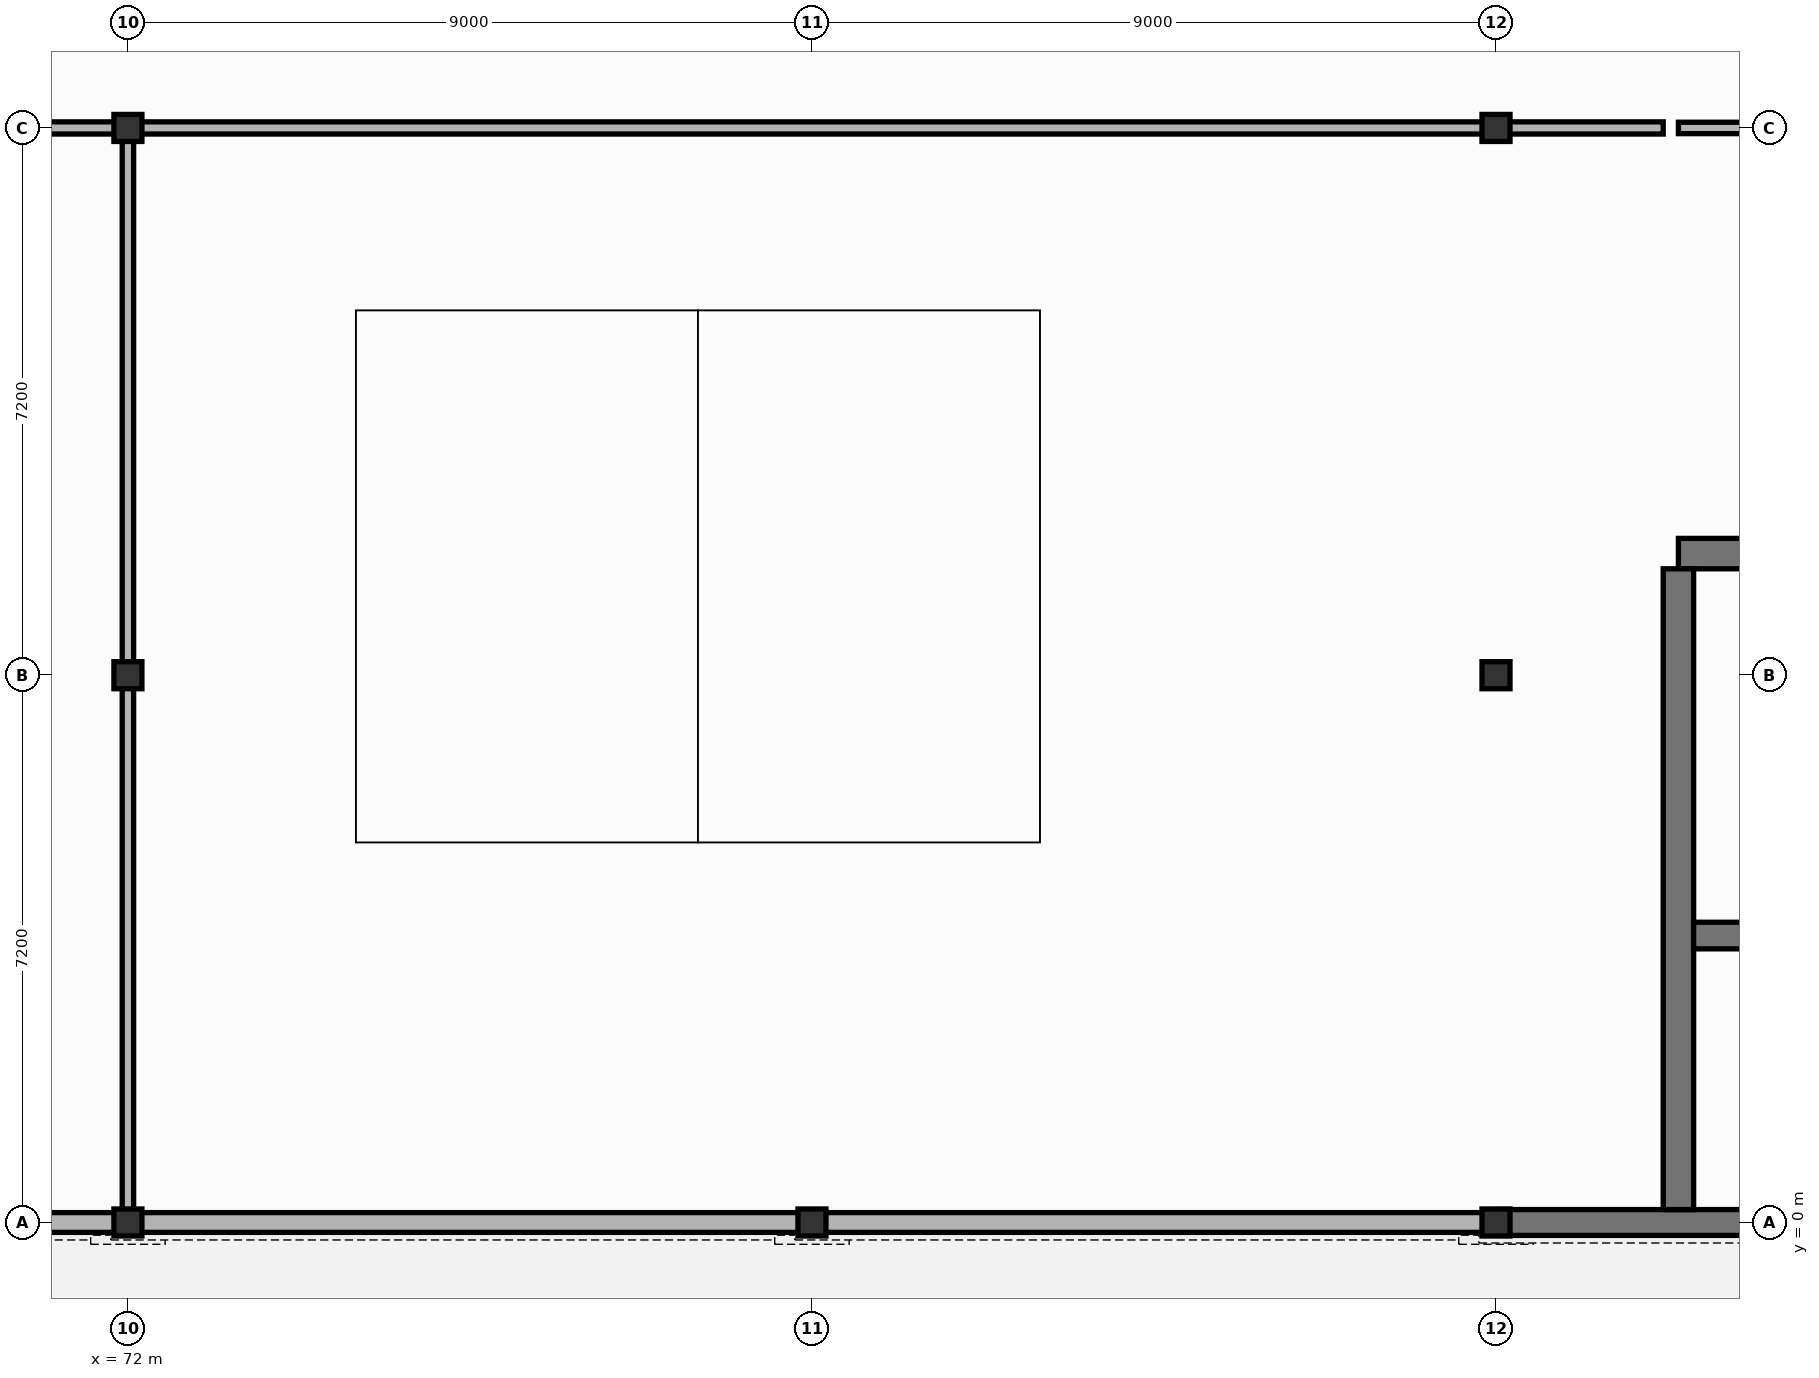
"""IFC4 building model, lengths in metres.
Left out: names, types, materials, properties, quantities, classifications, styles, units other than length and angle.
Written with IfcOpenShell. Run it as: python <this file> out.ifc"""

import sys

from ifc_helpers import new_model, si_unit, direction, frame, frame_2d, origin, origin_2d, place, context, subcontext, project, spatial, rectangle, i_section, extrude, element, fill, save


model = new_model("IFC4")
c1 = context("Model", 3, precision=1e-05, world=origin(), true_north=direction((0.0, 1.0)))
c2 = subcontext(c1, "Body", "Model", "MODEL_VIEW")
j1 = project(units=[si_unit("LENGTHUNIT", "METRE"), si_unit("PLANEANGLEUNIT", "RADIAN")], contexts=[c1])
p1 = place(None, origin())
s1 = spatial("IfcSite", under=j1, at=p1, CompositionType="ELEMENT")
p2 = place(p1, origin())
s2 = spatial("IfcBuilding", under=s1, at=p2, CompositionType="ELEMENT")
p3 = place(p2, origin())
s3 = spatial("IfcBuildingStorey", under=s2, at=p3, CompositionType="ELEMENT", Elevation=0.0)
for number, where, z_axis, x_axis in (
    (1, (72.0, 0.0, 0.0), (0.0, 0.0, 1.0), (1.0, 0.0, 0.0)),
    (2, (72.0, 7.2, 0.0), (0.0, 0.0, 1.0), (1.0, 0.0, 0.0)),
    (3, (72.0, 14.4, 0.0), (0.0, 0.0, 1.0), (1.0, 0.0, 0.0)),
    (4, (81.0, 0.0, 0.0), (0.0, 0.0, 1.0), (1.0, 0.0, 0.0)),
    (5, (90.0, 0.0, 0.0), (0.0, 0.0, 1.0), (1.0, 0.0, 0.0)),
    (6, (90.0, 7.2, 0.0), (0.0, 0.0, 1.0), (1.0, 0.0, 0.0)),
    (7, (90.0, 14.4, 0.0), (0.0, 0.0, 1.0), (1.0, 0.0, 0.0)),
):
    element("IfcColumn", number, at=place(p3, frame(where, z_axis=z_axis, x_axis=x_axis)), inside=s3, PredefinedType="COLUMN", context=c2, shape_type="SweptSolid", body=[
        extrude(i_section(OverallWidth=0.368, OverallDepth=0.356, WebThickness=0.011, FlangeThickness=0.018, at=origin_2d()), origin(), (0.0, 0.0, 1.0), 5.1),
    ])
p4 = place(p3, frame((63.0, 0.0, 0.0), z_axis=(0.0, 0.0, 1.0), x_axis=(1.0, 0.0, 0.0)))
e8 = element("IfcWall", 8, at=p4, inside=s3, PredefinedType="SOLIDWALL", context=c2, shape_type="SweptSolid", body=[
    extrude(rectangle(XDim=9.0, YDim=0.26, at=frame_2d((4.5, 0.0))), origin(), (0.0, 0.0, 1.0), 3.45),
])
p5 = place(p4, frame((1.8, 0.0, 0.65)))
e9 = element("IfcOpeningElement", 9, at=p5, cuts=e8, PredefinedType="OPENING", context=c2, shape_type="SweptSolid", body=[
    extrude(rectangle(XDim=2.2, YDim=1.95, at=frame_2d((1.1, 0.975))), frame((0.0, 0.14, 0.0), z_axis=(0.0, -1.0, 0.0), x_axis=(1.0, 0.0, 0.0)), (0.0, 0.0, 1.0), 0.28),
])
p6 = place(p4, frame((5.4, 0.0, 0.65)))
e10 = element("IfcOpeningElement", 10, at=p6, cuts=e8, PredefinedType="OPENING", context=c2, shape_type="SweptSolid", body=[
    extrude(rectangle(XDim=1.4, YDim=1.8, at=frame_2d((0.7, 0.9))), frame((0.0, 0.14, 0.0), z_axis=(0.0, -1.0, 0.0), x_axis=(1.0, 0.0, 0.0)), (0.0, 0.0, 1.0), 0.28),
])
p7 = place(p3, frame((72.0, 0.0, 0.0), z_axis=(0.0, 0.0, 1.0), x_axis=(1.0, 0.0, 0.0)))
e11 = element("IfcWall", 11, at=p7, inside=s3, PredefinedType="SOLIDWALL", context=c2, shape_type="SweptSolid", body=[
    extrude(rectangle(XDim=9.0, YDim=0.26, at=frame_2d((4.5, 0.0))), origin(), (0.0, 0.0, 1.0), 3.45),
])
p8 = place(p7, frame((1.8, 0.0, 0.65)))
e12 = element("IfcOpeningElement", 12, at=p8, cuts=e11, PredefinedType="OPENING", context=c2, shape_type="SweptSolid", body=[
    extrude(rectangle(XDim=2.2, YDim=1.95, at=frame_2d((1.1, 0.975))), frame((0.0, 0.14, 0.0), z_axis=(0.0, -1.0, 0.0), x_axis=(1.0, 0.0, 0.0)), (0.0, 0.0, 1.0), 0.28),
])
p9 = place(p7, frame((5.4, 0.0, 0.65)))
e13 = element("IfcOpeningElement", 13, at=p9, cuts=e11, PredefinedType="OPENING", context=c2, shape_type="SweptSolid", body=[
    extrude(rectangle(XDim=1.4, YDim=1.8, at=frame_2d((0.7, 0.9))), frame((0.0, 0.14, 0.0), z_axis=(0.0, -1.0, 0.0), x_axis=(1.0, 0.0, 0.0)), (0.0, 0.0, 1.0), 0.28),
])
p10 = place(p3, frame((81.0, 0.0, 0.0), z_axis=(0.0, 0.0, 1.0), x_axis=(1.0, 0.0, 0.0)))
e14 = element("IfcWall", 14, at=p10, inside=s3, PredefinedType="SOLIDWALL", context=c2, shape_type="SweptSolid", body=[
    extrude(rectangle(XDim=9.0, YDim=0.26, at=frame_2d((4.5, 0.0))), origin(), (0.0, 0.0, 1.0), 3.45),
])
p11 = place(p10, frame((1.8, 0.0, 0.65)))
e15 = element("IfcOpeningElement", 15, at=p11, cuts=e14, PredefinedType="OPENING", context=c2, shape_type="SweptSolid", body=[
    extrude(rectangle(XDim=2.2, YDim=1.95, at=frame_2d((1.1, 0.975))), frame((0.0, 0.14, 0.0), z_axis=(0.0, -1.0, 0.0), x_axis=(1.0, 0.0, 0.0)), (0.0, 0.0, 1.0), 0.28),
])
p12 = place(p10, frame((5.4, 0.0, 0.65)))
e16 = element("IfcOpeningElement", 16, at=p12, cuts=e14, PredefinedType="OPENING", context=c2, shape_type="SweptSolid", body=[
    extrude(rectangle(XDim=1.4, YDim=1.8, at=frame_2d((0.7, 0.9))), frame((0.0, 0.14, 0.0), z_axis=(0.0, -1.0, 0.0), x_axis=(1.0, 0.0, 0.0)), (0.0, 0.0, 1.0), 0.28),
])
p13 = place(p3, frame((90.0, 0.0, 0.0), z_axis=(0.0, 0.0, 1.0), x_axis=(1.0, 0.0, 0.0)))
e17 = element("IfcWall", 17, at=p13, inside=s3, PredefinedType="SOLIDWALL", context=c2, shape_type="SweptSolid", body=[
    extrude(rectangle(XDim=9.0, YDim=0.34, at=frame_2d((4.5, 0.0))), origin(), (0.0, 0.0, 1.0), 4.8),
])
p14 = place(p13, frame((2.75, 0.0, 0.0)))
e18 = element("IfcOpeningElement", 18, at=p14, cuts=e17, PredefinedType="OPENING", context=c2, shape_type="SweptSolid", body=[
    extrude(rectangle(XDim=1.8, YDim=2.4, at=frame_2d((0.9, 1.2))), frame((0.0, 0.18, 0.0), z_axis=(0.0, -1.0, 0.0), x_axis=(1.0, 0.0, 0.0)), (0.0, 0.0, 1.0), 0.36),
])
p15 = place(p3, frame((92.4, 8.8, 0.0), z_axis=(0.0, 0.0, 1.0), x_axis=(1.0, 0.0, 0.0)))
e19 = element("IfcWall", 19, at=p15, inside=s3, PredefinedType="SHEAR", context=c2, shape_type="SweptSolid", body=[
    extrude(rectangle(XDim=10.4, YDim=0.4, at=frame_2d((5.2, 0.0))), origin(), (0.0, 0.0, 1.0), 4.8),
])
p16 = place(p15, frame((2.4, 0.0, 0.0)))
e20 = element("IfcOpeningElement", 20, at=p16, cuts=e19, PredefinedType="OPENING", context=c2, shape_type="SweptSolid", body=[
    extrude(rectangle(XDim=1.5, YDim=2.2, at=frame_2d((0.75, 1.1))), frame((0.0, 0.21, 0.0), z_axis=(0.0, -1.0, 0.0), x_axis=(1.0, 0.0, 0.0)), (0.0, 0.0, 1.0), 0.42),
])
p17 = place(p3, frame((92.4, 0.17, 0.0), z_axis=(0.0, 0.0, 1.0), x_axis=(0.0, 1.0, 0.0)))
e21 = element("IfcWall", 21, at=p17, inside=s3, PredefinedType="SHEAR", context=c2, shape_type="SweptSolid", body=[
    extrude(rectangle(XDim=8.43, YDim=0.4, at=frame_2d((4.215, 0.0))), origin(), (0.0, 0.0, 1.0), 4.8),
])
p18 = place(p3, frame((92.6, 3.775, 0.0), z_axis=(0.0, 0.0, 1.0), x_axis=(1.0, 0.0, 0.0)))
e22 = element("IfcWall", 22, at=p18, inside=s3, PredefinedType="SHEAR", context=c2, shape_type="SweptSolid", body=[
    extrude(rectangle(XDim=10.0, YDim=0.35, at=frame_2d((5.0, 0.0))), origin(), (0.0, 0.0, 1.0), 4.8),
])
p19 = place(p18, frame((0.45, 0.0, 0.0)))
e23 = element("IfcOpeningElement", 23, at=p19, cuts=e22, PredefinedType="OPENING", context=c2, shape_type="SweptSolid", body=[
    extrude(rectangle(XDim=1.05, YDim=2.2, at=frame_2d((0.525, 1.1))), frame((0.0, 0.185, 0.0), z_axis=(0.0, -1.0, 0.0), x_axis=(1.0, 0.0, 0.0)), (0.0, 0.0, 1.0), 0.37),
])
p20 = place(p3, frame((54.0, 14.4, 0.0), z_axis=(0.0, 0.0, 1.0), x_axis=(1.0, 0.0, 0.0)))
e24 = element("IfcWall", 24, at=p20, inside=s3, PredefinedType="PARTITIONING", context=c2, shape_type="SweptSolid", body=[
    extrude(rectangle(XDim=38.2, YDim=0.16, at=frame_2d((19.1, 0.0))), origin(), (0.0, 0.0, 1.0), 3.898),
])
p21 = place(p20, frame((3.6, 0.0, 0.0)))
e25 = element("IfcOpeningElement", 25, at=p21, cuts=e24, PredefinedType="OPENING", context=c2, shape_type="SweptSolid", body=[
    extrude(rectangle(XDim=1.6, YDim=2.2, at=frame_2d((0.8, 1.1))), frame((0.0, 0.09, 0.0), z_axis=(0.0, -1.0, 0.0), x_axis=(1.0, 0.0, 0.0)), (0.0, 0.0, 1.0), 0.18),
])
p22 = place(p20, frame((21.6, 0.0, 0.0)))
e26 = element("IfcOpeningElement", 26, at=p22, cuts=e24, PredefinedType="OPENING", context=c2, shape_type="SweptSolid", body=[
    extrude(rectangle(XDim=1.6, YDim=2.2, at=frame_2d((0.8, 1.1))), frame((0.0, 0.09, 0.0), z_axis=(0.0, -1.0, 0.0), x_axis=(1.0, 0.0, 0.0)), (0.0, 0.0, 1.0), 0.18),
])
p23 = place(p3, frame((72.0, 0.0, 0.0), z_axis=(0.0, 0.0, 1.0), x_axis=(0.0, 1.0, 0.0)))
e27 = element("IfcWall", 27, at=p23, inside=s3, PredefinedType="PARTITIONING", context=c2, shape_type="SweptSolid", body=[
    extrude(rectangle(XDim=14.4, YDim=0.15, at=frame_2d((7.2, 0.0))), origin(), (0.0, 0.0, 1.0), 4.363),
])
p24 = place(p3, frame((92.4, 14.4, 0.0), z_axis=(0.0, 0.0, 1.0), x_axis=(1.0, 0.0, 0.0)))
e28 = element("IfcWall", 28, at=p24, inside=s3, PredefinedType="PARTITIONING", context=c2, shape_type="SweptSolid", body=[
    extrude(rectangle(XDim=15.6, YDim=0.15, at=frame_2d((7.8, 0.0))), origin(), (0.0, 0.0, 1.0), 4.208),
])
p25 = place(p24, frame((4.5, 0.0, 0.0)))
e29 = element("IfcOpeningElement", 29, at=p25, cuts=e28, PredefinedType="OPENING", context=c2, shape_type="SweptSolid", body=[
    extrude(rectangle(XDim=1.0, YDim=2.15, at=frame_2d((0.5, 1.075))), frame((0.0, 0.085, 0.0), z_axis=(0.0, -1.0, 0.0), x_axis=(1.0, 0.0, 0.0)), (0.0, 0.0, 1.0), 0.17),
])
p26 = place(p24, frame((11.8, 0.0, 0.0)))
e30 = element("IfcOpeningElement", 30, at=p26, cuts=e28, PredefinedType="OPENING", context=c2, shape_type="SweptSolid", body=[
    extrude(rectangle(XDim=0.95, YDim=2.15, at=frame_2d((0.475, 1.075))), frame((0.0, 0.085, 0.0), z_axis=(0.0, -1.0, 0.0), x_axis=(1.0, 0.0, 0.0)), (0.0, 0.0, 1.0), 0.17),
])
p27 = place(p8, origin())
e31 = element("IfcWindow", 31, at=p27, inside=s3, PartitioningType="SINGLE_PANEL", PredefinedType="WINDOW", context=c2, shape_type="SweptSolid", body=[
    extrude(rectangle(XDim=2.2, YDim=1.95, at=frame_2d((1.1, 0.975))), frame((0.0, 0.03, 0.0), z_axis=(0.0, -1.0, 0.0), x_axis=(1.0, 0.0, 0.0)), (0.0, 0.0, 1.0), 0.06),
])
fill(e12, e31)
p28 = place(p9, origin())
e32 = element("IfcWindow", 32, at=p28, inside=s3, PartitioningType="SINGLE_PANEL", PredefinedType="WINDOW", context=c2, shape_type="SweptSolid", body=[
    extrude(rectangle(XDim=1.4, YDim=1.8, at=frame_2d((0.7, 0.9))), frame((0.0, 0.03, 0.0), z_axis=(0.0, -1.0, 0.0), x_axis=(1.0, 0.0, 0.0)), (0.0, 0.0, 1.0), 0.06),
])
fill(e13, e32)
p29 = place(p11, origin())
e33 = element("IfcWindow", 33, at=p29, inside=s3, PartitioningType="SINGLE_PANEL", PredefinedType="WINDOW", context=c2, shape_type="SweptSolid", body=[
    extrude(rectangle(XDim=2.2, YDim=1.95, at=frame_2d((1.1, 0.975))), frame((0.0, 0.03, 0.0), z_axis=(0.0, -1.0, 0.0), x_axis=(1.0, 0.0, 0.0)), (0.0, 0.0, 1.0), 0.06),
])
fill(e15, e33)
p30 = place(p12, origin())
e34 = element("IfcWindow", 34, at=p30, inside=s3, PartitioningType="SINGLE_PANEL", PredefinedType="WINDOW", context=c2, shape_type="SweptSolid", body=[
    extrude(rectangle(XDim=1.4, YDim=1.8, at=frame_2d((0.7, 0.9))), frame((0.0, 0.03, 0.0), z_axis=(0.0, -1.0, 0.0), x_axis=(1.0, 0.0, 0.0)), (0.0, 0.0, 1.0), 0.06),
])
fill(e16, e34)
p31 = place(p14, frame((1.8, 0.0, 0.0), z_axis=(0.0, 0.0, 1.0), x_axis=(-1.0, 0.0, 0.0)))
e35 = element("IfcDoor", 35, at=p31, inside=s3, OperationType="DOUBLE_DOOR_SINGLE_SWING", PredefinedType="DOOR", context=c2, shape_type="SweptSolid", body=[
    extrude(rectangle(XDim=1.8, YDim=2.4, at=frame_2d((0.9, 1.2))), frame((0.0, 0.025, 0.0), z_axis=(0.0, -1.0, 0.0), x_axis=(1.0, 0.0, 0.0)), (0.0, 0.0, 1.0), 0.05),
])
fill(e18, e35)
p32 = place(p19, origin())
e36 = element("IfcDoor", 36, at=p32, inside=s3, OperationType="SINGLE_SWING_LEFT", PredefinedType="DOOR", context=c2, shape_type="SweptSolid", body=[
    extrude(rectangle(XDim=1.05, YDim=2.2, at=frame_2d((0.525, 1.1))), frame((0.0, 0.025, 0.0), z_axis=(0.0, -1.0, 0.0), x_axis=(1.0, 0.0, 0.0)), (0.0, 0.0, 1.0), 0.05),
])
fill(e23, e36)
p33 = place(p22, origin())
e37 = element("IfcDoor", 37, at=p33, inside=s3, OperationType="DOUBLE_DOOR_SINGLE_SWING", PredefinedType="DOOR", context=c2, shape_type="SweptSolid", body=[
    extrude(rectangle(XDim=1.6, YDim=2.2, at=frame_2d((0.8, 1.1))), frame((0.0, 0.025, 0.0), z_axis=(0.0, -1.0, 0.0), x_axis=(1.0, 0.0, 0.0)), (0.0, 0.0, 1.0), 0.05),
])
fill(e26, e37)
save(model, sys.argv[1])
